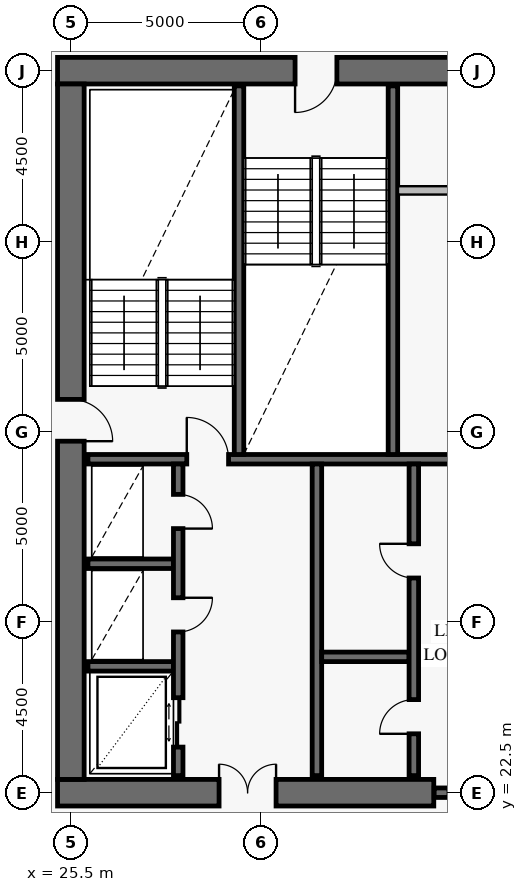
"""IFC4 building model, lengths in metres.
Left out: names, types, materials, properties, quantities, classifications, styles, units other than length and angle.
Written with IfcOpenShell. Run it as: python <this file> out.ifc"""

import sys

from ifc_helpers import new_model, si_unit, direction, frame, frame_2d, origin, place, context, subcontext, project, spatial, rectangle, extrude, element, fill, save


model = new_model("IFC4")
c1 = context("Model", 3, precision=1e-05, world=origin(), true_north=direction((0.0, 1.0)))
c2 = subcontext(c1, "Body", "Model", "MODEL_VIEW")
j1 = project(units=[si_unit("LENGTHUNIT", "METRE"), si_unit("PLANEANGLEUNIT", "RADIAN")], contexts=[c1])
p1 = place(None, origin())
s1 = spatial("IfcSite", under=j1, at=p1, CompositionType="ELEMENT")
p2 = place(p1, origin())
s2 = spatial("IfcBuilding", under=s1, at=p2, CompositionType="ELEMENT")
p3 = place(p2, frame((0.0, 0.0, 173.2)))
s3 = spatial("IfcBuildingStorey", under=s2, at=p3, CompositionType="ELEMENT", Elevation=173.2)
p4 = place(p3, frame((25.15, 22.5, 0.0), z_axis=(0.0, 0.0, 1.0), x_axis=(1.0, 0.0, 0.0)))
e1 = element("IfcWall", 1, at=p4, inside=s3, PredefinedType="SHEAR", context=c2, shape_type="SweptSolid", body=[
    extrude(rectangle(XDim=9.9, YDim=0.7, at=frame_2d((4.95, 0.0))), origin(), (0.0, 0.0, 1.0), 3.8),
])
p5 = place(p4, frame((4.25, 0.0, 0.0)))
e2 = element("IfcOpeningElement", 2, at=p5, cuts=e1, PredefinedType="OPENING", context=c2, shape_type="SweptSolid", body=[
    extrude(rectangle(XDim=1.5, YDim=2.15, at=frame_2d((0.75, 1.075))), frame((0.0, 0.362, 0.0), z_axis=(0.0, -1.0, 0.0), x_axis=(1.0, 0.0, 0.0)), (0.0, 0.0, 1.0), 0.724),
])
p6 = place(p3, frame((36.75, 41.5, 0.0), z_axis=(0.0, 0.0, 1.0), x_axis=(-1.0, 0.0, 0.0)))
e3 = element("IfcWall", 3, at=p6, inside=s3, PredefinedType="SHEAR", context=c2, shape_type="SweptSolid", body=[
    extrude(rectangle(XDim=11.6, YDim=0.7, at=frame_2d((5.8, 0.0))), origin(), (0.0, 0.0, 1.0), 3.8),
])
p7 = place(p6, frame((4.25, 0.0, 0.0)))
e4 = element("IfcOpeningElement", 4, at=p7, cuts=e3, PredefinedType="OPENING", context=c2, shape_type="SweptSolid", body=[
    extrude(rectangle(XDim=1.1, YDim=2.15, at=frame_2d((0.55, 1.075))), frame((0.0, 0.362, 0.0), z_axis=(0.0, -1.0, 0.0), x_axis=(1.0, 0.0, 0.0)), (0.0, 0.0, 1.0), 0.724),
])
p8 = place(p3, frame((25.5, 22.85, 0.0), z_axis=(0.0, 0.0, 1.0), x_axis=(0.0, 1.0, 0.0)))
e5 = element("IfcWall", 5, at=p8, inside=s3, PredefinedType="SHEAR", context=c2, shape_type="SweptSolid", body=[
    extrude(rectangle(XDim=18.3, YDim=0.7, at=frame_2d((9.15, 0.0))), origin(), (0.0, 0.0, 1.0), 3.8),
])
p9 = place(p8, frame((8.9, 0.0, 0.0)))
e6 = element("IfcOpeningElement", 6, at=p9, cuts=e5, PredefinedType="OPENING", context=c2, shape_type="SweptSolid", body=[
    extrude(rectangle(XDim=1.1, YDim=2.15, at=frame_2d((0.55, 1.075))), frame((0.0, 0.362, 0.0), z_axis=(0.0, -1.0, 0.0), x_axis=(1.0, 0.0, 0.0)), (0.0, 0.0, 1.0), 0.724),
])
p10 = place(p3, frame((35.06, 22.5, 0.0), z_axis=(0.0, 0.0, 1.0), x_axis=(1.0, 0.0, 0.0)))
e7 = element("IfcWall", 7, at=p10, inside=s3, PredefinedType="SOLIDWALL", context=c2, shape_type="SweptSolid", body=[
    extrude(rectangle(XDim=2.28, YDim=0.25, at=frame_2d((1.14, 0.0))), origin(), (0.0, 0.0, 1.0), 3.8),
])
p11 = place(p10, frame((0.39, 0.0, 0.0)))
e8 = element("IfcOpeningElement", 8, at=p11, cuts=e7, PredefinedType="OPENING", context=c2, shape_type="SweptSolid", body=[
    extrude(rectangle(XDim=1.5, YDim=2.15, at=frame_2d((0.75, 1.075))), frame((0.0, 0.137, 0.0), z_axis=(0.0, -1.0, 0.0), x_axis=(1.0, 0.0, 0.0)), (0.0, 0.0, 1.0), 0.274),
])
p12 = place(p3, frame((25.95, 31.275, 0.0), z_axis=(0.0, 0.0, 1.0), x_axis=(1.0, 0.0, 0.0)))
e9 = element("IfcWall", 9, at=p12, inside=s3, PredefinedType="SOLIDWALL", context=c2, shape_type="SweptSolid", body=[
    extrude(rectangle(XDim=20.1, YDim=0.25, at=frame_2d((10.05, 0.0))), origin(), (0.0, 0.0, 1.0), 3.8),
])
p13 = place(p12, frame((2.6, 0.0, 0.0)))
e10 = element("IfcOpeningElement", 10, at=p13, cuts=e9, PredefinedType="OPENING", context=c2, shape_type="SweptSolid", body=[
    extrude(rectangle(XDim=1.1, YDim=2.15, at=frame_2d((0.55, 1.075))), frame((0.0, 0.137, 0.0), z_axis=(0.0, -1.0, 0.0), x_axis=(1.0, 0.0, 0.0)), (0.0, 0.0, 1.0), 0.274),
])
p14 = place(p12, frame((10.6, 0.0, 0.0)))
e11 = element("IfcOpeningElement", 11, at=p14, cuts=e9, PredefinedType="OPENING", context=c2, shape_type="SweptSolid", body=[
    extrude(rectangle(XDim=1.1, YDim=2.15, at=frame_2d((0.55, 1.075))), frame((0.0, 0.137, 0.0), z_axis=(0.0, -1.0, 0.0), x_axis=(1.0, 0.0, 0.0)), (0.0, 0.0, 1.0), 0.274),
])
p15 = place(p12, frame((16.35, 0.0, 0.0)))
e12 = element("IfcOpeningElement", 12, at=p15, cuts=e9, PredefinedType="OPENING", context=c2, shape_type="SweptSolid", body=[
    extrude(rectangle(XDim=1.1, YDim=2.15, at=frame_2d((0.55, 1.075))), frame((0.0, 0.137, 0.0), z_axis=(0.0, -1.0, 0.0), x_axis=(1.0, 0.0, 0.0)), (0.0, 0.0, 1.0), 0.274),
])
for number, where, z_axis, x_axis in (
    (13, (29.925, 31.4, 0.0), (0.0, 0.0, 1.0), (0.0, 1.0, 0.0)),
    (14, (33.975, 31.4, 0.0), (0.0, 0.0, 1.0), (0.0, 1.0, 0.0)),
):
    element("IfcWall", number, at=place(p3, frame(where, z_axis=z_axis, x_axis=x_axis)), inside=s3, PredefinedType="SOLIDWALL", context=c2, shape_type="SweptSolid", body=[
        extrude(rectangle(XDim=9.7, YDim=0.25, at=frame_2d((4.85, 0.0))), origin(), (0.0, 0.0, 1.0), 3.8),
    ])
for number, where, z_axis, x_axis in (
    (15, (25.95, 25.825, 0.0), (0.0, 0.0, 1.0), (1.0, 0.0, 0.0)),
    (16, (25.95, 28.525, 0.0), (0.0, 0.0, 1.0), (1.0, 0.0, 0.0)),
):
    element("IfcWall", number, at=place(p3, frame(where, z_axis=z_axis, x_axis=x_axis)), inside=s3, PredefinedType="SOLIDWALL", context=c2, shape_type="SweptSolid", body=[
        extrude(rectangle(XDim=2.25, YDim=0.25, at=frame_2d((1.125, 0.0))), origin(), (0.0, 0.0, 1.0), 3.8),
    ])
p16 = place(p3, frame((28.325, 22.95, 0.0), z_axis=(0.0, 0.0, 1.0), x_axis=(0.0, 1.0, 0.0)))
e17 = element("IfcWall", 17, at=p16, inside=s3, PredefinedType="SOLIDWALL", context=c2, shape_type="SweptSolid", body=[
    extrude(rectangle(XDim=8.2, YDim=0.25, at=frame_2d((4.1, 0.0))), origin(), (0.0, 0.0, 1.0), 3.8),
])
p17 = place(p16, frame((0.75, 0.0, 0.0)))
e18 = element("IfcOpeningElement", 18, at=p17, cuts=e17, PredefinedType="OPENING", context=c2, shape_type="SweptSolid", body=[
    extrude(rectangle(XDim=1.3, YDim=2.3, at=frame_2d((0.65, 1.15))), frame((0.0, 0.137, 0.0), z_axis=(0.0, -1.0, 0.0), x_axis=(1.0, 0.0, 0.0)), (0.0, 0.0, 1.0), 0.274),
])
p18 = place(p16, frame((3.78, 0.0, 0.0)))
e19 = element("IfcOpeningElement", 19, at=p18, cuts=e17, PredefinedType="OPENING", context=c2, shape_type="SweptSolid", body=[
    extrude(rectangle(XDim=0.9, YDim=2.1, at=frame_2d((0.45, 1.05))), frame((0.0, 0.137, 0.0), z_axis=(0.0, -1.0, 0.0), x_axis=(1.0, 0.0, 0.0)), (0.0, 0.0, 1.0), 0.274),
])
p19 = place(p16, frame((6.5, 0.0, 0.0)))
e20 = element("IfcOpeningElement", 20, at=p19, cuts=e17, PredefinedType="OPENING", context=c2, shape_type="SweptSolid", body=[
    extrude(rectangle(XDim=0.9, YDim=2.1, at=frame_2d((0.45, 1.05))), frame((0.0, 0.137, 0.0), z_axis=(0.0, -1.0, 0.0), x_axis=(1.0, 0.0, 0.0)), (0.0, 0.0, 1.0), 0.274),
])
p20 = place(p3, frame((31.975, 22.95, 0.0), z_axis=(0.0, 0.0, 1.0), x_axis=(0.0, 1.0, 0.0)))
e21 = element("IfcWall", 21, at=p20, inside=s3, PredefinedType="SOLIDWALL", context=c2, shape_type="SweptSolid", body=[
    extrude(rectangle(XDim=8.2, YDim=0.25, at=frame_2d((4.1, 0.0))), origin(), (0.0, 0.0, 1.0), 3.8),
])
p21 = place(p3, frame((32.1, 26.075, 0.0), z_axis=(0.0, 0.0, 1.0), x_axis=(1.0, 0.0, 0.0)))
e22 = element("IfcWall", 22, at=p21, inside=s3, PredefinedType="SOLIDWALL", context=c2, shape_type="SweptSolid", body=[
    extrude(rectangle(XDim=2.3, YDim=0.25, at=frame_2d((1.15, 0.0))), origin(), (0.0, 0.0, 1.0), 3.8),
])
p22 = place(p3, frame((34.525, 22.95, 0.0), z_axis=(0.0, 0.0, 1.0), x_axis=(0.0, 1.0, 0.0)))
e23 = element("IfcWall", 23, at=p22, inside=s3, PredefinedType="SOLIDWALL", context=c2, shape_type="SweptSolid", body=[
    extrude(rectangle(XDim=8.2, YDim=0.25, at=frame_2d((4.1, 0.0))), origin(), (0.0, 0.0, 1.0), 3.8),
])
p23 = place(p22, frame((1.1, 0.0, 0.0)))
e24 = element("IfcOpeningElement", 24, at=p23, cuts=e23, PredefinedType="OPENING", context=c2, shape_type="SweptSolid", body=[
    extrude(rectangle(XDim=0.9, YDim=2.1, at=frame_2d((0.45, 1.05))), frame((0.0, 0.137, 0.0), z_axis=(0.0, -1.0, 0.0), x_axis=(1.0, 0.0, 0.0)), (0.0, 0.0, 1.0), 0.274),
])
p24 = place(p22, frame((5.2, 0.0, 0.0)))
e25 = element("IfcOpeningElement", 25, at=p24, cuts=e23, PredefinedType="OPENING", context=c2, shape_type="SweptSolid", body=[
    extrude(rectangle(XDim=0.9, YDim=2.1, at=frame_2d((0.45, 1.05))), frame((0.0, 0.137, 0.0), z_axis=(0.0, -1.0, 0.0), x_axis=(1.0, 0.0, 0.0)), (0.0, 0.0, 1.0), 0.274),
])
p25 = place(p3, frame((34.108, 38.35, 0.0), z_axis=(0.0, 0.0, 1.0), x_axis=(1.0, 0.0, 0.0)))
e26 = element("IfcWall", 26, at=p25, inside=s3, PredefinedType="PARTITIONING", context=c2, shape_type="SweptSolid", body=[
    extrude(rectangle(XDim=2.084, YDim=0.22, at=frame_2d((1.042, 0.0))), origin(), (0.0, 0.0, 1.0), 3.55),
])
p26 = place(p9, frame((1.1, 0.0, 0.0), z_axis=(0.0, 0.0, 1.0), x_axis=(-1.0, 0.0, 0.0)))
e27 = element("IfcDoor", 27, at=p26, inside=s3, OperationType="SINGLE_SWING_RIGHT", PredefinedType="USERDEFINED", context=c2, shape_type="SweptSolid", body=[
    extrude(rectangle(XDim=1.1, YDim=2.15, at=frame_2d((0.55, 1.075))), frame((0.0, 0.025, 0.0), z_axis=(0.0, -1.0, 0.0), x_axis=(1.0, 0.0, 0.0)), (0.0, 0.0, 1.0), 0.05),
])
fill(e6, e27)
p27 = place(p7, origin())
e28 = element("IfcDoor", 28, at=p27, inside=s3, OperationType="SINGLE_SWING_RIGHT", PredefinedType="USERDEFINED", context=c2, shape_type="SweptSolid", body=[
    extrude(rectangle(XDim=1.1, YDim=2.15, at=frame_2d((0.55, 1.075))), frame((0.0, 0.025, 0.0), z_axis=(0.0, -1.0, 0.0), x_axis=(1.0, 0.0, 0.0)), (0.0, 0.0, 1.0), 0.05),
])
fill(e4, e28)
p28 = place(p5, origin())
e29 = element("IfcDoor", 29, at=p28, inside=s3, OperationType="DOUBLE_DOOR_SINGLE_SWING", PredefinedType="DOOR", context=c2, shape_type="SweptSolid", body=[
    extrude(rectangle(XDim=1.5, YDim=2.15, at=frame_2d((0.75, 1.075))), frame((0.0, 0.025, 0.0), z_axis=(0.0, -1.0, 0.0), x_axis=(1.0, 0.0, 0.0)), (0.0, 0.0, 1.0), 0.05),
])
fill(e2, e29)
p29 = place(p13, origin())
e30 = element("IfcDoor", 30, at=p29, inside=s3, OperationType="SINGLE_SWING_LEFT", PredefinedType="USERDEFINED", context=c2, shape_type="SweptSolid", body=[
    extrude(rectangle(XDim=1.1, YDim=2.15, at=frame_2d((0.55, 1.075))), frame((0.0, 0.025, 0.0), z_axis=(0.0, -1.0, 0.0), x_axis=(1.0, 0.0, 0.0)), (0.0, 0.0, 1.0), 0.05),
])
fill(e10, e30)
p30 = place(p17, frame((1.3, 0.0, 0.0), z_axis=(0.0, 0.0, 1.0), x_axis=(-1.0, 0.0, 0.0)))
e31 = element("IfcDoor", 31, at=p30, inside=s3, OperationType="DOUBLE_DOOR_SLIDING", PredefinedType="DOOR", context=c2, shape_type="SweptSolid", body=[
    extrude(rectangle(XDim=1.3, YDim=2.3, at=frame_2d((0.65, 1.15))), frame((0.0, 0.025, 0.0), z_axis=(0.0, -1.0, 0.0), x_axis=(1.0, 0.0, 0.0)), (0.0, 0.0, 1.0), 0.05),
])
fill(e18, e31)
p31 = place(p18, frame((0.9, 0.0, 0.0), z_axis=(0.0, 0.0, 1.0), x_axis=(-1.0, 0.0, 0.0)))
e32 = element("IfcDoor", 32, at=p31, inside=s3, OperationType="SINGLE_SWING_LEFT", PredefinedType="DOOR", context=c2, shape_type="SweptSolid", body=[
    extrude(rectangle(XDim=0.9, YDim=2.1, at=frame_2d((0.45, 1.05))), frame((0.0, 0.025, 0.0), z_axis=(0.0, -1.0, 0.0), x_axis=(1.0, 0.0, 0.0)), (0.0, 0.0, 1.0), 0.05),
])
fill(e19, e32)
p32 = place(p19, frame((0.9, 0.0, 0.0), z_axis=(0.0, 0.0, 1.0), x_axis=(-1.0, 0.0, 0.0)))
e33 = element("IfcDoor", 33, at=p32, inside=s3, OperationType="SINGLE_SWING_RIGHT", PredefinedType="DOOR", context=c2, shape_type="SweptSolid", body=[
    extrude(rectangle(XDim=0.9, YDim=2.1, at=frame_2d((0.45, 1.05))), frame((0.0, 0.025, 0.0), z_axis=(0.0, -1.0, 0.0), x_axis=(1.0, 0.0, 0.0)), (0.0, 0.0, 1.0), 0.05),
])
fill(e20, e33)
p33 = place(p23, origin())
e34 = element("IfcDoor", 34, at=p33, inside=s3, OperationType="SINGLE_SWING_LEFT", PredefinedType="DOOR", context=c2, shape_type="SweptSolid", body=[
    extrude(rectangle(XDim=0.9, YDim=2.1, at=frame_2d((0.45, 1.05))), frame((0.0, 0.025, 0.0), z_axis=(0.0, -1.0, 0.0), x_axis=(1.0, 0.0, 0.0)), (0.0, 0.0, 1.0), 0.05),
])
fill(e24, e34)
p34 = place(p24, origin())
e35 = element("IfcDoor", 35, at=p34, inside=s3, OperationType="SINGLE_SWING_RIGHT", PredefinedType="DOOR", context=c2, shape_type="SweptSolid", body=[
    extrude(rectangle(XDim=0.9, YDim=2.1, at=frame_2d((0.45, 1.05))), frame((0.0, 0.025, 0.0), z_axis=(0.0, -1.0, 0.0), x_axis=(1.0, 0.0, 0.0)), (0.0, 0.0, 1.0), 0.05),
])
fill(e25, e35)
save(model, sys.argv[1])
